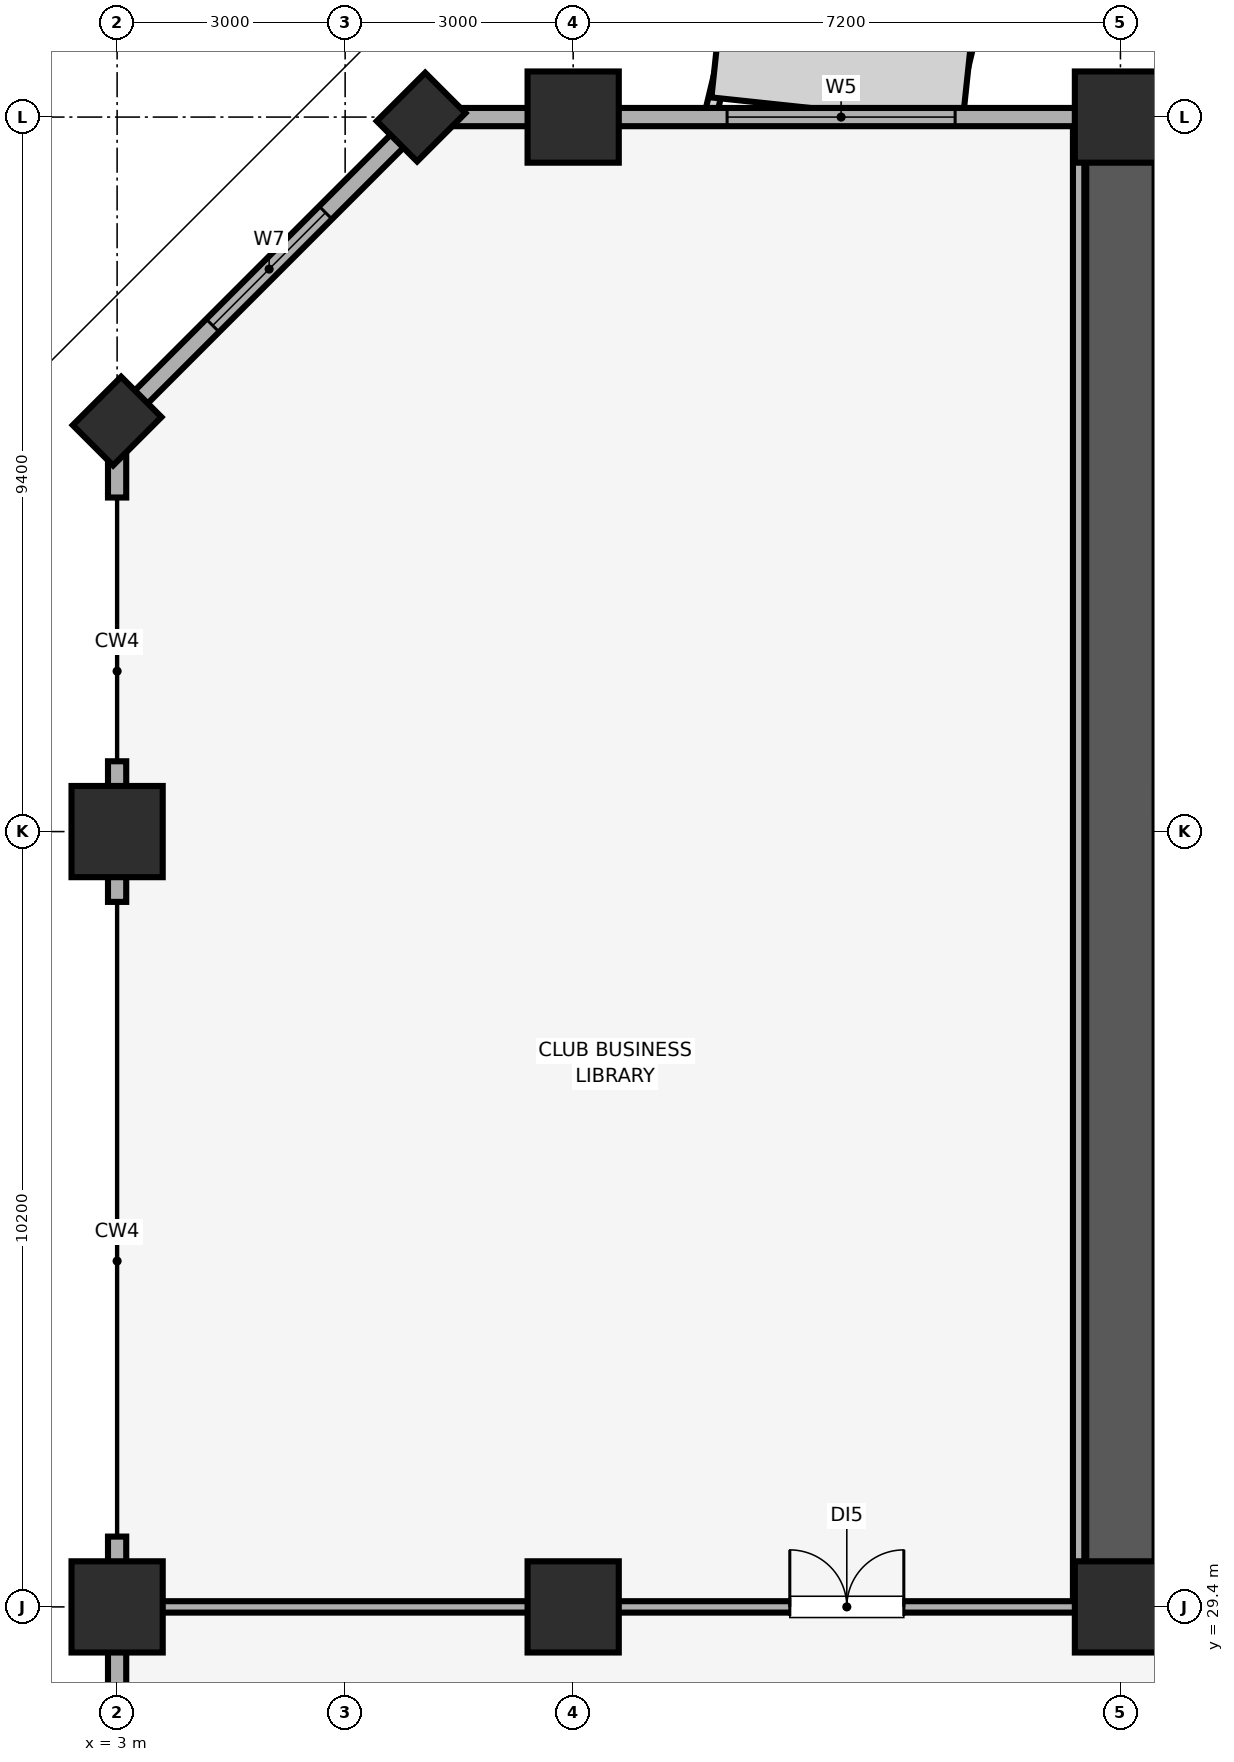
"""IFC4 building model, lengths in metres.
Left out: names, types, materials, properties, quantities, classifications, styles, units other than length and angle.
Written with IfcOpenShell. Run it as: python <this file> out.ifc"""

import sys

from ifc_helpers import new_model, si_unit, direction, frame, frame_2d, origin, origin_2d, place, context, subcontext, project, spatial, rectangle, extrude, element, fill, save


model = new_model("IFC4")
c1 = context("Model", 3, precision=1e-05, world=origin(), true_north=direction((0.0, 1.0)))
c2 = subcontext(c1, "Body", "Model", "MODEL_VIEW")
j1 = project(units=[si_unit("LENGTHUNIT", "METRE"), si_unit("PLANEANGLEUNIT", "RADIAN")], contexts=[c1])
p1 = place(None, origin())
s1 = spatial("IfcSite", under=j1, at=p1, CompositionType="ELEMENT")
p2 = place(p1, origin())
s2 = spatial("IfcBuilding", under=s1, at=p2, CompositionType="ELEMENT")
p3 = place(p2, frame((0.0, 0.0, 224.35)))
s3 = spatial("IfcBuildingStorey", under=s2, at=p3, CompositionType="ELEMENT", Elevation=224.35)
for number, where, z_axis, x_axis in (
    (1, (3.0, 29.4, 0.0), (0.0, 0.0, 1.0), (1.0, 0.0, 0.0)),
    (2, (3.0, 39.6, 0.0), (0.0, 0.0, 1.0), (1.0, 0.0, 0.0)),
):
    element("IfcColumn", number, at=place(p3, frame(where, z_axis=z_axis, x_axis=x_axis)), inside=s3, PredefinedType="COLUMN", context=c2, shape_type="SweptSolid", body=[
        extrude(rectangle(XDim=1.2, YDim=1.2, at=origin_2d()), origin(), (0.0, 0.0, 1.0), 4.56),
    ])
for number, where, z_axis, x_axis in (
    (3, (7.0, 49.0, 0.0), (0.0, 0.0, 1.0), (0.707, 0.707, 0.0)),
    (4, (3.0, 45.0, 0.0), (0.0, 0.0, 1.0), (0.707, 0.707, 0.0)),
):
    element("IfcColumn", number, at=place(p3, frame(where, z_axis=z_axis, x_axis=x_axis)), inside=s3, PredefinedType="PILASTER", context=c2, shape_type="SweptSolid", body=[
        extrude(rectangle(XDim=0.9, YDim=0.75, at=origin_2d()), origin(), (0.0, 0.0, 1.0), 4.56),
    ])
for number, where, z_axis, x_axis in (
    (5, (9.0, 29.4, 0.0), (0.0, 0.0, 1.0), (1.0, 0.0, 0.0)),
    (6, (9.0, 49.0, 0.0), (0.0, 0.0, 1.0), (1.0, 0.0, 0.0)),
    (7, (16.2, 29.4, 0.0), (0.0, 0.0, 1.0), (1.0, 0.0, 0.0)),
    (8, (16.2, 49.0, 0.0), (0.0, 0.0, 1.0), (1.0, 0.0, 0.0)),
):
    element("IfcColumn", number, at=place(p3, frame(where, z_axis=z_axis, x_axis=x_axis)), inside=s3, PredefinedType="COLUMN", context=c2, shape_type="SweptSolid", body=[
        extrude(rectangle(XDim=1.2, YDim=1.2, at=origin_2d()), origin(), (0.0, 0.0, 1.0), 4.56),
    ])
p4 = place(p3, frame((77.0, 49.0, 0.0), z_axis=(0.0, 0.0, 1.0), x_axis=(-1.0, 0.0, 0.0)))
e9 = element("IfcWall", 9, at=p4, inside=s3, PredefinedType="SOLIDWALL", context=c2, shape_type="SweptSolid", body=[
    extrude(rectangle(XDim=70.0, YDim=0.24, at=frame_2d((35.0, 0.0))), origin(), (0.0, 0.0, 1.0), 3.4),
])
p5 = place(p4, frame((62.975, 0.0, 0.85)))
e10 = element("IfcOpeningElement", 10, at=p5, cuts=e9, PredefinedType="OPENING", context=c2, shape_type="SweptSolid", body=[
    extrude(rectangle(XDim=3.0, YDim=1.5, at=frame_2d((1.5, 0.75))), frame((0.0, 0.13, 0.0), z_axis=(0.0, -1.0, 0.0), x_axis=(1.0, 0.0, 0.0)), (0.0, 0.0, 1.0), 0.26),
])
p6 = place(p4, frame((4.025, 0.0, 0.85)))
e11 = element("IfcOpeningElement", 11, at=p6, cuts=e9, PredefinedType="OPENING", context=c2, shape_type="SweptSolid", body=[
    extrude(rectangle(XDim=3.0, YDim=1.5, at=frame_2d((1.5, 0.75))), frame((0.0, 0.13, 0.0), z_axis=(0.0, -1.0, 0.0), x_axis=(1.0, 0.0, 0.0)), (0.0, 0.0, 1.0), 0.26),
])
p7 = place(p4, frame((49.465, 0.0, 0.9)))
e12 = element("IfcOpeningElement", 12, at=p7, cuts=e9, PredefinedType="OPENING", context=c2, shape_type="SweptSolid", body=[
    extrude(rectangle(XDim=1.5, YDim=1.4, at=frame_2d((0.75, 0.7))), frame((0.0, 0.13, 0.0), z_axis=(0.0, -1.0, 0.0), x_axis=(1.0, 0.0, 0.0)), (0.0, 0.0, 1.0), 0.26),
])
p8 = place(p4, frame((41.65, 0.0, 0.9)))
e13 = element("IfcOpeningElement", 13, at=p8, cuts=e9, PredefinedType="OPENING", context=c2, shape_type="SweptSolid", body=[
    extrude(rectangle(XDim=3.6, YDim=1.5, at=frame_2d((1.8, 0.75))), frame((0.0, 0.13, 0.0), z_axis=(0.0, -1.0, 0.0), x_axis=(1.0, 0.0, 0.0)), (0.0, 0.0, 1.0), 0.26),
])
p9 = place(p4, frame((28.25, 0.0, 0.9)))
e14 = element("IfcOpeningElement", 14, at=p9, cuts=e9, PredefinedType="OPENING", context=c2, shape_type="SweptSolid", body=[
    extrude(rectangle(XDim=1.5, YDim=1.4, at=frame_2d((0.75, 0.7))), frame((0.0, 0.13, 0.0), z_axis=(0.0, -1.0, 0.0), x_axis=(1.0, 0.0, 0.0)), (0.0, 0.0, 1.0), 0.26),
])
p10 = place(p4, frame((24.6, 0.0, 0.9)))
e15 = element("IfcOpeningElement", 15, at=p10, cuts=e9, PredefinedType="OPENING", context=c2, shape_type="SweptSolid", body=[
    extrude(rectangle(XDim=2.4, YDim=1.5, at=frame_2d((1.2, 0.75))), frame((0.0, 0.13, 0.0), z_axis=(0.0, -1.0, 0.0), x_axis=(1.0, 0.0, 0.0)), (0.0, 0.0, 1.0), 0.26),
])
p11 = place(p4, frame((20.235, 0.0, 0.9)))
e16 = element("IfcOpeningElement", 16, at=p11, cuts=e9, PredefinedType="OPENING", context=c2, shape_type="SweptSolid", body=[
    extrude(rectangle(XDim=2.4, YDim=1.5, at=frame_2d((1.2, 0.75))), frame((0.0, 0.13, 0.0), z_axis=(0.0, -1.0, 0.0), x_axis=(1.0, 0.0, 0.0)), (0.0, 0.0, 1.0), 0.26),
])
p12 = place(p3, frame((7.0, 49.0, 0.0), z_axis=(0.0, 0.0, 1.0), x_axis=(-0.707106781187, -0.707106781187, 0.0)))
e17 = element("IfcWall", 17, at=p12, inside=s3, PredefinedType="SOLIDWALL", context=c2, shape_type="SweptSolid", body=[
    extrude(rectangle(XDim=5.657, YDim=0.24, at=frame_2d((2.828, 0.0))), origin(), (0.0, 0.0, 1.0), 4.52),
])
p13 = place(p12, frame((1.778, 0.0, 0.85)))
e18 = element("IfcOpeningElement", 18, at=p13, cuts=e17, PredefinedType="OPENING", context=c2, shape_type="SweptSolid", body=[
    extrude(rectangle(XDim=2.1, YDim=1.6, at=frame_2d((1.05, 0.8))), frame((0.0, 0.13, 0.0), z_axis=(0.0, -1.0, 0.0), x_axis=(1.0, 0.0, 0.0)), (0.0, 0.0, 1.0), 0.26),
])
p14 = place(p3, frame((3.0, 45.0, 0.0), z_axis=(0.0, 0.0, 1.0), x_axis=(0.0, -1.0, 0.0)))
e19 = element("IfcWall", 19, at=p14, inside=s3, PredefinedType="SOLIDWALL", context=c2, shape_type="SweptSolid", body=[
    extrude(rectangle(XDim=1.005, YDim=0.24, at=frame_2d((0.502, 0.0))), origin(), (0.0, 0.0, 1.0), 4.52),
])
p15 = place(p3, frame((3.0, 40.525, 0.0), z_axis=(0.0, 0.0, 1.0), x_axis=(0.0, -1.0, 0.0)))
e20 = element("IfcWall", 20, at=p15, inside=s3, PredefinedType="SOLIDWALL", context=c2, shape_type="SweptSolid", body=[
    extrude(rectangle(XDim=1.85, YDim=0.24, at=frame_2d((0.925, 0.0))), origin(), (0.0, 0.0, 1.0), 4.52),
])
p16 = place(p3, frame((3.0, 30.325, 0.0), z_axis=(0.0, 0.0, 1.0), x_axis=(0.0, -1.0, 0.0)))
e21 = element("IfcWall", 21, at=p16, inside=s3, PredefinedType="SOLIDWALL", context=c2, shape_type="SweptSolid", body=[
    extrude(rectangle(XDim=3.85, YDim=0.24, at=frame_2d((1.925, 0.0))), origin(), (0.0, 0.0, 1.0), 4.52),
])
p17 = place(p3, frame((16.2, 29.4, 0.0), z_axis=(0.0, 0.0, 1.0), x_axis=(0.0, 1.0, 0.0)))
e22 = element("IfcWall", 22, at=p17, inside=s3, PredefinedType="SHEAR", context=c2, shape_type="SweptSolid", body=[
    extrude(rectangle(XDim=19.2, YDim=0.9, at=frame_2d((9.6, 0.0))), origin(), (0.0, 0.0, 1.0), 4.52),
])
p18 = place(p3, frame((3.15, 29.4, 0.0), z_axis=(0.0, 0.0, 1.0), x_axis=(1.0, 0.0, 0.0)))
e23 = element("IfcWall", 23, at=p18, inside=s3, PredefinedType="PARTITIONING", context=c2, shape_type="SweptSolid", body=[
    extrude(rectangle(XDim=12.5, YDim=0.15, at=frame_2d((6.25, 0.0))), origin(), (0.0, 0.0, 1.0), 3.4),
])
p19 = place(p18, frame((8.7, 0.0, 0.0)))
e24 = element("IfcOpeningElement", 24, at=p19, cuts=e23, PredefinedType="OPENING", context=c2, shape_type="SweptSolid", body=[
    extrude(rectangle(XDim=1.5, YDim=2.25, at=frame_2d((0.75, 1.125))), frame((0.0, 0.085, 0.0), z_axis=(0.0, -1.0, 0.0), x_axis=(1.0, 0.0, 0.0)), (0.0, 0.0, 1.0), 0.17),
])
p20 = place(p3, frame((15.65, 29.48, 0.0), z_axis=(0.0, 0.0, 1.0), x_axis=(0.0, 1.0, 0.0)))
e25 = element("IfcWall", 25, at=p20, inside=s3, PredefinedType="PARTITIONING", context=c2, shape_type="SweptSolid", body=[
    extrude(rectangle(XDim=19.37, YDim=0.15, at=frame_2d((9.685, 0.0))), origin(), (0.0, 0.0, 1.0), 4.52),
])
p21 = place(p13, origin())
e26 = element("IfcWindow", 26, at=p21, inside=s3, PartitioningType="SINGLE_PANEL", PredefinedType="WINDOW", context=c2, shape_type="SweptSolid", body=[
    extrude(rectangle(XDim=2.1, YDim=1.6, at=frame_2d((1.05, 0.8))), frame((0.0, 0.03, 0.0), z_axis=(0.0, -1.0, 0.0), x_axis=(1.0, 0.0, 0.0)), (0.0, 0.0, 1.0), 0.06),
])
fill(e18, e26)
p22 = place(p5, origin())
e27 = element("IfcWindow", 27, at=p22, inside=s3, PartitioningType="SINGLE_PANEL", PredefinedType="WINDOW", context=c2, shape_type="SweptSolid", body=[
    extrude(rectangle(XDim=3.0, YDim=1.5, at=frame_2d((1.5, 0.75))), frame((0.0, 0.03, 0.0), z_axis=(0.0, -1.0, 0.0), x_axis=(1.0, 0.0, 0.0)), (0.0, 0.0, 1.0), 0.06),
])
fill(e10, e27)
p23 = place(p19, origin())
e28 = element("IfcDoor", 28, at=p23, inside=s3, OperationType="DOUBLE_DOOR_SINGLE_SWING", PredefinedType="DOOR", context=c2, shape_type="SweptSolid", body=[
    extrude(rectangle(XDim=1.5, YDim=2.25, at=frame_2d((0.75, 1.125))), frame((0.0, 0.025, 0.0), z_axis=(0.0, -1.0, 0.0), x_axis=(1.0, 0.0, 0.0)), (0.0, 0.0, 1.0), 0.05),
])
fill(e24, e28)
save(model, sys.argv[1])
